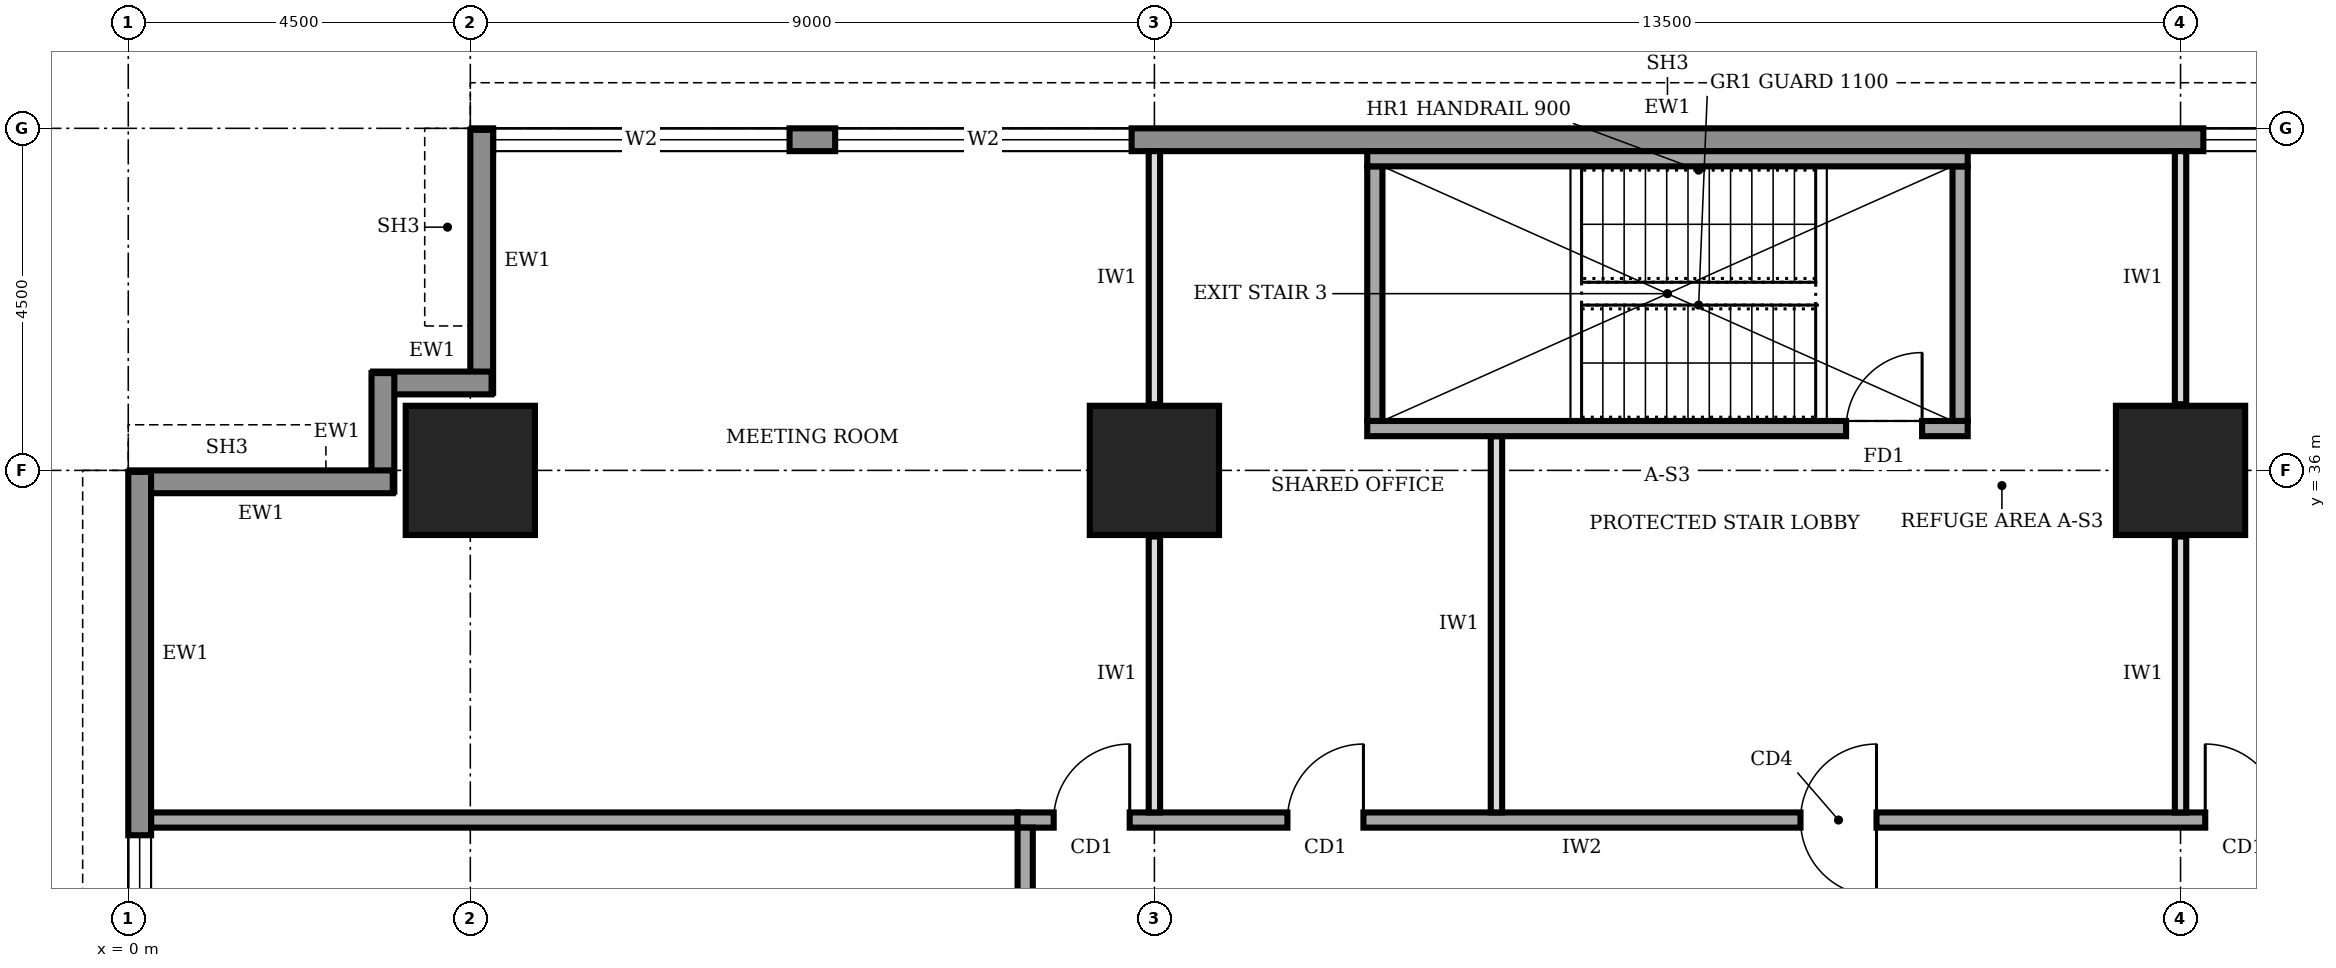
"""IFC4 building model, lengths in metres.
Left out: names, types, materials, properties, quantities, classifications, styles, units other than length and angle.
Written with IfcOpenShell. Run it as: python <this file> out.ifc"""

import sys

from ifc_helpers import new_model, si_unit, direction, frame, frame_2d, origin, origin_2d, place, context, subcontext, project, spatial, rectangle, extrude, element, fill, save


model = new_model("IFC4")
c1 = context("Model", 3, precision=1e-05, world=origin(), true_north=direction((0.0, 1.0)))
c2 = subcontext(c1, "Body", "Model", "MODEL_VIEW")
j1 = project(units=[si_unit("LENGTHUNIT", "METRE"), si_unit("PLANEANGLEUNIT", "RADIAN")], contexts=[c1])
p1 = place(None, origin())
s1 = spatial("IfcSite", under=j1, at=p1, CompositionType="ELEMENT")
p2 = place(p1, origin())
s2 = spatial("IfcBuilding", under=s1, at=p2, CompositionType="ELEMENT")
p3 = place(p2, frame((0.0, 0.0, 137.0)))
s3 = spatial("IfcBuildingStorey", under=s2, at=p3, CompositionType="ELEMENT", Elevation=137.0)
for number, where, z_axis, x_axis in (
    (1, (4.5, 36.0, 0.0), (0.0, 0.0, 1.0), (1.0, 0.0, 0.0)),
    (2, (13.5, 36.0, 0.0), (0.0, 0.0, 1.0), (1.0, 0.0, 0.0)),
    (3, (27.0, 36.0, 0.0), (0.0, 0.0, 1.0), (1.0, 0.0, 0.0)),
):
    element("IfcColumn", number, at=place(p3, frame(where, z_axis=z_axis, x_axis=x_axis)), inside=s3, PredefinedType="COLUMN", context=c2, shape_type="SweptSolid", body=[
        extrude(rectangle(XDim=1.7, YDim=1.7, at=origin_2d()), origin(), (0.0, 0.0, 1.0), 4.0),
    ])
p4 = place(p3, frame((35.98, 40.35, 0.0), z_axis=(0.0, 0.0, 1.0), x_axis=(-1.0, 0.0, 0.0)))
e4 = element("IfcWall", 4, at=p4, inside=s3, PredefinedType="STANDARD", context=c2, shape_type="SweptSolid", body=[
    extrude(rectangle(XDim=31.46, YDim=0.3, at=frame_2d((15.73, 0.0))), origin(), (0.0, 0.0, 1.0), 3.75),
])
p5 = place(p4, frame((27.28, 0.0, 0.6)))
e5 = element("IfcOpeningElement", 5, at=p5, cuts=e4, PredefinedType="OPENING", context=c2, shape_type="SweptSolid", body=[
    extrude(rectangle(XDim=3.9, YDim=2.6, at=frame_2d((1.95, 1.3))), frame((0.0, 0.16, 0.0), z_axis=(0.0, -1.0, 0.0), x_axis=(1.0, 0.0, 0.0)), (0.0, 0.0, 1.0), 0.32),
])
p6 = place(p4, frame((22.78, 0.0, 0.6)))
e6 = element("IfcOpeningElement", 6, at=p6, cuts=e4, PredefinedType="OPENING", context=c2, shape_type="SweptSolid", body=[
    extrude(rectangle(XDim=3.9, YDim=2.6, at=frame_2d((1.95, 1.3))), frame((0.0, 0.16, 0.0), z_axis=(0.0, -1.0, 0.0), x_axis=(1.0, 0.0, 0.0)), (0.0, 0.0, 1.0), 0.32),
])
p7 = place(p4, frame((4.78, 0.0, 0.6)))
e7 = element("IfcOpeningElement", 7, at=p7, cuts=e4, PredefinedType="OPENING", context=c2, shape_type="SweptSolid", body=[
    extrude(rectangle(XDim=3.9, YDim=2.6, at=frame_2d((1.95, 1.3))), frame((0.0, 0.16, 0.0), z_axis=(0.0, -1.0, 0.0), x_axis=(1.0, 0.0, 0.0)), (0.0, 0.0, 1.0), 0.32),
])
p8 = place(p3, frame((4.65, 40.48, 0.0), z_axis=(0.0, 0.0, 1.0), x_axis=(0.0, -1.0, 0.0)))
e8 = element("IfcWall", 8, at=p8, inside=s3, PredefinedType="STANDARD", context=c2, shape_type="SweptSolid", body=[
    extrude(rectangle(XDim=3.46, YDim=0.3, at=frame_2d((1.73, 0.0))), origin(), (0.0, 0.0, 1.0), 2.85),
])
for number, where, z_axis, x_axis in (
    (9, (4.78, 37.15, 0.0), (0.0, 0.0, 1.0), (-1.0, 0.0, 0.0)),
    (10, (3.35, 37.28, 0.0), (0.0, 0.0, 1.0), (0.0, -1.0, 0.0)),
):
    element("IfcWall", number, at=place(p3, frame(where, z_axis=z_axis, x_axis=x_axis)), inside=s3, PredefinedType="STANDARD", context=c2, shape_type="SweptSolid", body=[
        extrude(rectangle(XDim=1.56, YDim=0.3, at=frame_2d((0.78, 0.0))), origin(), (0.0, 0.0, 1.0), 3.75),
    ])
p9 = place(p3, frame((3.48, 35.85, 0.0), z_axis=(0.0, 0.0, 1.0), x_axis=(-1.0, 0.0, 0.0)))
e11 = element("IfcWall", 11, at=p9, inside=s3, PredefinedType="STANDARD", context=c2, shape_type="SweptSolid", body=[
    extrude(rectangle(XDim=3.46, YDim=0.3, at=frame_2d((1.73, 0.0))), origin(), (0.0, 0.0, 1.0), 2.85),
])
p10 = place(p3, frame((0.15, 35.98, 0.0), z_axis=(0.0, 0.0, 1.0), x_axis=(0.0, -1.0, 0.0)))
e12 = element("IfcWall", 12, at=p10, inside=s3, PredefinedType="STANDARD", context=c2, shape_type="SweptSolid", body=[
    extrude(rectangle(XDim=31.46, YDim=0.3, at=frame_2d((15.73, 0.0))), origin(), (0.0, 0.0, 1.0), 3.75),
])
p11 = place(p10, frame((27.28, 0.0, 0.6)))
e13 = element("IfcOpeningElement", 13, at=p11, cuts=e12, PredefinedType="OPENING", context=c2, shape_type="SweptSolid", body=[
    extrude(rectangle(XDim=3.9, YDim=2.6, at=frame_2d((1.95, 1.3))), frame((0.0, 0.16, 0.0), z_axis=(0.0, -1.0, 0.0), x_axis=(1.0, 0.0, 0.0)), (0.0, 0.0, 1.0), 0.32),
])
p12 = place(p10, frame((22.78, 0.0, 0.6)))
e14 = element("IfcOpeningElement", 14, at=p12, cuts=e12, PredefinedType="OPENING", context=c2, shape_type="SweptSolid", body=[
    extrude(rectangle(XDim=3.9, YDim=2.6, at=frame_2d((1.95, 1.3))), frame((0.0, 0.16, 0.0), z_axis=(0.0, -1.0, 0.0), x_axis=(1.0, 0.0, 0.0)), (0.0, 0.0, 1.0), 0.32),
])
p13 = place(p10, frame((18.28, 0.0, 0.6)))
e15 = element("IfcOpeningElement", 15, at=p13, cuts=e12, PredefinedType="OPENING", context=c2, shape_type="SweptSolid", body=[
    extrude(rectangle(XDim=3.9, YDim=2.6, at=frame_2d((1.95, 1.3))), frame((0.0, 0.16, 0.0), z_axis=(0.0, -1.0, 0.0), x_axis=(1.0, 0.0, 0.0)), (0.0, 0.0, 1.0), 0.32),
])
p14 = place(p10, frame((13.78, 0.0, 0.6)))
e16 = element("IfcOpeningElement", 16, at=p14, cuts=e12, PredefinedType="OPENING", context=c2, shape_type="SweptSolid", body=[
    extrude(rectangle(XDim=3.9, YDim=2.6, at=frame_2d((1.95, 1.3))), frame((0.0, 0.16, 0.0), z_axis=(0.0, -1.0, 0.0), x_axis=(1.0, 0.0, 0.0)), (0.0, 0.0, 1.0), 0.32),
])
p15 = place(p10, frame((9.28, 0.0, 0.6)))
e17 = element("IfcOpeningElement", 17, at=p15, cuts=e12, PredefinedType="OPENING", context=c2, shape_type="SweptSolid", body=[
    extrude(rectangle(XDim=3.9, YDim=2.6, at=frame_2d((1.95, 1.3))), frame((0.0, 0.16, 0.0), z_axis=(0.0, -1.0, 0.0), x_axis=(1.0, 0.0, 0.0)), (0.0, 0.0, 1.0), 0.32),
])
p16 = place(p10, frame((4.78, 0.0, 0.6)))
e18 = element("IfcOpeningElement", 18, at=p16, cuts=e12, PredefinedType="OPENING", context=c2, shape_type="SweptSolid", body=[
    extrude(rectangle(XDim=3.9, YDim=2.6, at=frame_2d((1.95, 1.3))), frame((0.0, 0.16, 0.0), z_axis=(0.0, -1.0, 0.0), x_axis=(1.0, 0.0, 0.0)), (0.0, 0.0, 1.0), 0.32),
])
p17 = place(p3, frame((28.6, 31.4, 0.0), z_axis=(0.0, 0.0, 1.0), x_axis=(-1.0, 0.0, 0.0)))
e19 = element("IfcWall", 19, at=p17, inside=s3, PredefinedType="SOLIDWALL", context=c2, shape_type="SweptSolid", body=[
    extrude(rectangle(XDim=16.9, YDim=0.2, at=frame_2d((8.45, 0.0))), origin(), (0.0, 0.0, 1.0), 3.75),
])
p18 = place(p17, frame((15.425, 0.0, 0.0)))
e20 = element("IfcOpeningElement", 20, at=p18, cuts=e19, PredefinedType="OPENING", context=c2, shape_type="SweptSolid", body=[
    extrude(rectangle(XDim=1.0, YDim=2.1, at=frame_2d((0.5, 1.05))), frame((0.0, 0.11, 0.0), z_axis=(0.0, -1.0, 0.0), x_axis=(1.0, 0.0, 0.0)), (0.0, 0.0, 1.0), 0.22),
])
p19 = place(p17, frame((12.35, 0.0, 0.0)))
e21 = element("IfcOpeningElement", 21, at=p19, cuts=e19, PredefinedType="OPENING", context=c2, shape_type="SweptSolid", body=[
    extrude(rectangle(XDim=1.0, YDim=2.1, at=frame_2d((0.5, 1.05))), frame((0.0, 0.11, 0.0), z_axis=(0.0, -1.0, 0.0), x_axis=(1.0, 0.0, 0.0)), (0.0, 0.0, 1.0), 0.22),
])
p20 = place(p17, frame((5.6, 0.0, 0.0)))
e22 = element("IfcOpeningElement", 22, at=p20, cuts=e19, PredefinedType="OPENING", context=c2, shape_type="SweptSolid", body=[
    extrude(rectangle(XDim=1.0, YDim=2.1, at=frame_2d((0.5, 1.05))), frame((0.0, 0.11, 0.0), z_axis=(0.0, -1.0, 0.0), x_axis=(1.0, 0.0, 0.0)), (0.0, 0.0, 1.0), 0.22),
])
p21 = place(p17, frame((0.275, 0.0, 0.0)))
e23 = element("IfcOpeningElement", 23, at=p21, cuts=e19, PredefinedType="OPENING", context=c2, shape_type="SweptSolid", body=[
    extrude(rectangle(XDim=1.0, YDim=2.1, at=frame_2d((0.5, 1.05))), frame((0.0, 0.11, 0.0), z_axis=(0.0, -1.0, 0.0), x_axis=(1.0, 0.0, 0.0)), (0.0, 0.0, 1.0), 0.22),
])
p22 = place(p3, frame((11.8, 31.3, 0.0), z_axis=(0.0, 0.0, 1.0), x_axis=(0.0, -1.0, 0.0)))
e24 = element("IfcWall", 24, at=p22, inside=s3, PredefinedType="SOLIDWALL", context=c2, shape_type="SweptSolid", body=[
    extrude(rectangle(XDim=22.3, YDim=0.2, at=frame_2d((11.15, 0.0))), origin(), (0.0, 0.0, 1.0), 3.75),
])
p23 = place(p22, frame((19.55, 0.0, 0.0)))
e25 = element("IfcOpeningElement", 25, at=p23, cuts=e24, PredefinedType="OPENING", context=c2, shape_type="SweptSolid", body=[
    extrude(rectangle(XDim=1.0, YDim=2.1, at=frame_2d((0.5, 1.05))), frame((0.0, 0.11, 0.0), z_axis=(0.0, -1.0, 0.0), x_axis=(1.0, 0.0, 0.0)), (0.0, 0.0, 1.0), 0.22),
])
p24 = place(p22, frame((15.45, 0.0, 0.0)))
e26 = element("IfcOpeningElement", 26, at=p24, cuts=e24, PredefinedType="OPENING", context=c2, shape_type="SweptSolid", body=[
    extrude(rectangle(XDim=0.9, YDim=2.1, at=frame_2d((0.45, 1.05))), frame((0.0, 0.11, 0.0), z_axis=(0.0, -1.0, 0.0), x_axis=(1.0, 0.0, 0.0)), (0.0, 0.0, 1.0), 0.22),
])
p25 = place(p22, frame((12.45, 0.0, 0.0)))
e27 = element("IfcOpeningElement", 27, at=p25, cuts=e24, PredefinedType="OPENING", context=c2, shape_type="SweptSolid", body=[
    extrude(rectangle(XDim=0.9, YDim=2.1, at=frame_2d((0.45, 1.05))), frame((0.0, 0.11, 0.0), z_axis=(0.0, -1.0, 0.0), x_axis=(1.0, 0.0, 0.0)), (0.0, 0.0, 1.0), 0.22),
])
p26 = place(p22, frame((7.6, 0.0, 0.0)))
e28 = element("IfcOpeningElement", 28, at=p26, cuts=e24, PredefinedType="OPENING", context=c2, shape_type="SweptSolid", body=[
    extrude(rectangle(XDim=0.9, YDim=2.1, at=frame_2d((0.45, 1.05))), frame((0.0, 0.11, 0.0), z_axis=(0.0, -1.0, 0.0), x_axis=(1.0, 0.0, 0.0)), (0.0, 0.0, 1.0), 0.22),
])
p27 = place(p22, frame((4.8, 0.0, 0.0)))
e29 = element("IfcOpeningElement", 29, at=p27, cuts=e24, PredefinedType="OPENING", context=c2, shape_type="SweptSolid", body=[
    extrude(rectangle(XDim=1.0, YDim=2.1, at=frame_2d((0.5, 1.05))), frame((0.0, 0.11, 0.0), z_axis=(0.0, -1.0, 0.0), x_axis=(1.0, 0.0, 0.0)), (0.0, 0.0, 1.0), 0.22),
])
p28 = place(p22, frame((10.3, 0.0, 0.0)))
e30 = element("IfcOpeningElement", 30, at=p28, cuts=e24, PredefinedType="OPENING", context=c2, shape_type="SweptSolid", body=[
    extrude(rectangle(XDim=1.0, YDim=2.1, at=frame_2d((0.5, 1.05))), frame((0.0, 0.11, 0.0), z_axis=(0.0, -1.0, 0.0), x_axis=(1.0, 0.0, 0.0)), (0.0, 0.0, 1.0), 0.22),
])
p29 = place(p22, frame((1.55, 0.0, 0.0)))
e31 = element("IfcOpeningElement", 31, at=p29, cuts=e24, PredefinedType="OPENING", context=c2, shape_type="SweptSolid", body=[
    extrude(rectangle(XDim=1.0, YDim=2.1, at=frame_2d((0.5, 1.05))), frame((0.0, 0.11, 0.0), z_axis=(0.0, -1.0, 0.0), x_axis=(1.0, 0.0, 0.0)), (0.0, 0.0, 1.0), 0.22),
])
p30 = place(p3, frame((0.3, 31.4, 0.0), z_axis=(0.0, 0.0, 1.0), x_axis=(1.0, 0.0, 0.0)))
e32 = element("IfcWall", 32, at=p30, inside=s3, PredefinedType="SOLIDWALL", context=c2, shape_type="SweptSolid", body=[
    extrude(rectangle(XDim=11.4, YDim=0.2, at=frame_2d((5.7, 0.0))), origin(), (0.0, 0.0, 1.0), 3.75),
])
p31 = place(p3, frame((13.5, 31.5, 0.0), z_axis=(0.0, 0.0, 1.0), x_axis=(0.0, 1.0, 0.0)))
e33 = element("IfcWall", 33, at=p31, inside=s3, PredefinedType="PARTITIONING", context=c2, shape_type="SweptSolid", body=[
    extrude(rectangle(XDim=3.63, YDim=0.15, at=frame_2d((1.815, 0.0))), origin(), (0.0, 0.0, 1.0), 2.85),
])
p32 = place(p3, frame((13.5, 36.87, 0.0), z_axis=(0.0, 0.0, 1.0), x_axis=(0.0, 1.0, 0.0)))
e34 = element("IfcWall", 34, at=p32, inside=s3, PredefinedType="PARTITIONING", context=c2, shape_type="SweptSolid", body=[
    extrude(rectangle(XDim=3.33, YDim=0.15, at=frame_2d((1.665, 0.0))), origin(), (0.0, 0.0, 1.0), 2.85),
])
p33 = place(p3, frame((18.0, 31.5, 0.0), z_axis=(0.0, 0.0, 1.0), x_axis=(0.0, 1.0, 0.0)))
e35 = element("IfcWall", 35, at=p33, inside=s3, PredefinedType="PARTITIONING", context=c2, shape_type="SweptSolid", body=[
    extrude(rectangle(XDim=4.95, YDim=0.15, at=frame_2d((2.475, 0.0))), origin(), (0.0, 0.0, 1.0), 3.75),
])
p34 = place(p3, frame((27.0, 31.5, 0.0), z_axis=(0.0, 0.0, 1.0), x_axis=(0.0, 1.0, 0.0)))
e36 = element("IfcWall", 36, at=p34, inside=s3, PredefinedType="PARTITIONING", context=c2, shape_type="SweptSolid", body=[
    extrude(rectangle(XDim=3.63, YDim=0.15, at=frame_2d((1.815, 0.0))), origin(), (0.0, 0.0, 1.0), 2.85),
])
p35 = place(p3, frame((27.0, 36.87, 0.0), z_axis=(0.0, 0.0, 1.0), x_axis=(0.0, 1.0, 0.0)))
e37 = element("IfcWall", 37, at=p35, inside=s3, PredefinedType="PARTITIONING", context=c2, shape_type="SweptSolid", body=[
    extrude(rectangle(XDim=3.33, YDim=0.15, at=frame_2d((1.665, 0.0))), origin(), (0.0, 0.0, 1.0), 2.85),
])
p36 = place(p3, frame((16.3, 36.55, 0.0), z_axis=(0.0, 0.0, 1.0), x_axis=(1.0, 0.0, 0.0)))
e38 = element("IfcWall", 38, at=p36, inside=s3, PredefinedType="SOLIDWALL", context=c2, shape_type="SweptSolid", body=[
    extrude(rectangle(XDim=7.9, YDim=0.2, at=frame_2d((3.95, 0.0))), origin(), (0.0, 0.0, 1.0), 3.75),
])
p37 = place(p36, frame((6.3, 0.0, 0.0)))
e39 = element("IfcOpeningElement", 39, at=p37, cuts=e38, PredefinedType="OPENING", context=c2, shape_type="SweptSolid", body=[
    extrude(rectangle(XDim=1.0, YDim=2.1, at=frame_2d((0.5, 1.05))), frame((0.0, 0.11, 0.0), z_axis=(0.0, -1.0, 0.0), x_axis=(1.0, 0.0, 0.0)), (0.0, 0.0, 1.0), 0.22),
])
p38 = place(p3, frame((16.3, 40.1, 0.0), z_axis=(0.0, 0.0, 1.0), x_axis=(1.0, 0.0, 0.0)))
e40 = element("IfcWall", 40, at=p38, inside=s3, PredefinedType="SOLIDWALL", context=c2, shape_type="SweptSolid", body=[
    extrude(rectangle(XDim=7.9, YDim=0.2, at=frame_2d((3.95, 0.0))), origin(), (0.0, 0.0, 1.0), 3.75),
])
for number, where, z_axis, x_axis in (
    (41, (16.4, 36.65, 0.0), (0.0, 0.0, 1.0), (0.0, 1.0, 0.0)),
    (42, (24.1, 36.65, 0.0), (0.0, 0.0, 1.0), (0.0, 1.0, 0.0)),
):
    element("IfcWall", number, at=place(p3, frame(where, z_axis=z_axis, x_axis=x_axis)), inside=s3, PredefinedType="SOLIDWALL", context=c2, shape_type="SweptSolid", body=[
        extrude(rectangle(XDim=3.35, YDim=0.2, at=frame_2d((1.675, 0.0))), origin(), (0.0, 0.0, 1.0), 3.75),
    ])
p39 = place(p5, origin())
e43 = element("IfcWindow", 43, at=p39, inside=s3, PartitioningType="SINGLE_PANEL", PredefinedType="WINDOW", context=c2, shape_type="SweptSolid", body=[
    extrude(rectangle(XDim=3.9, YDim=2.6, at=frame_2d((1.95, 1.3))), frame((0.0, 0.03, 0.0), z_axis=(0.0, -1.0, 0.0), x_axis=(1.0, 0.0, 0.0)), (0.0, 0.0, 1.0), 0.06),
])
fill(e5, e43)
p40 = place(p6, origin())
e44 = element("IfcWindow", 44, at=p40, inside=s3, PartitioningType="SINGLE_PANEL", PredefinedType="WINDOW", context=c2, shape_type="SweptSolid", body=[
    extrude(rectangle(XDim=3.9, YDim=2.6, at=frame_2d((1.95, 1.3))), frame((0.0, 0.03, 0.0), z_axis=(0.0, -1.0, 0.0), x_axis=(1.0, 0.0, 0.0)), (0.0, 0.0, 1.0), 0.06),
])
fill(e6, e44)
p41 = place(p7, origin())
e45 = element("IfcWindow", 45, at=p41, inside=s3, PartitioningType="SINGLE_PANEL", PredefinedType="WINDOW", context=c2, shape_type="SweptSolid", body=[
    extrude(rectangle(XDim=3.9, YDim=2.6, at=frame_2d((1.95, 1.3))), frame((0.0, 0.03, 0.0), z_axis=(0.0, -1.0, 0.0), x_axis=(1.0, 0.0, 0.0)), (0.0, 0.0, 1.0), 0.06),
])
fill(e7, e45)
p42 = place(p16, origin())
e46 = element("IfcWindow", 46, at=p42, inside=s3, PartitioningType="SINGLE_PANEL", PredefinedType="WINDOW", context=c2, shape_type="SweptSolid", body=[
    extrude(rectangle(XDim=3.9, YDim=2.6, at=frame_2d((1.95, 1.3))), frame((0.0, 0.03, 0.0), z_axis=(0.0, -1.0, 0.0), x_axis=(1.0, 0.0, 0.0)), (0.0, 0.0, 1.0), 0.06),
])
fill(e18, e46)
p43 = place(p18, frame((1.0, 0.0, 0.0), z_axis=(0.0, 0.0, 1.0), x_axis=(-1.0, 0.0, 0.0)))
e47 = element("IfcDoor", 47, at=p43, inside=s3, OperationType="SINGLE_SWING_RIGHT", PredefinedType="DOOR", context=c2, shape_type="SweptSolid", body=[
    extrude(rectangle(XDim=1.0, YDim=2.1, at=frame_2d((0.5, 1.05))), frame((0.0, 0.025, 0.0), z_axis=(0.0, -1.0, 0.0), x_axis=(1.0, 0.0, 0.0)), (0.0, 0.0, 1.0), 0.05),
])
fill(e20, e47)
p44 = place(p19, frame((1.0, 0.0, 0.0), z_axis=(0.0, 0.0, 1.0), x_axis=(-1.0, 0.0, 0.0)))
e48 = element("IfcDoor", 48, at=p44, inside=s3, OperationType="SINGLE_SWING_RIGHT", PredefinedType="DOOR", context=c2, shape_type="SweptSolid", body=[
    extrude(rectangle(XDim=1.0, YDim=2.1, at=frame_2d((0.5, 1.05))), frame((0.0, 0.025, 0.0), z_axis=(0.0, -1.0, 0.0), x_axis=(1.0, 0.0, 0.0)), (0.0, 0.0, 1.0), 0.05),
])
fill(e21, e48)
p45 = place(p20, origin())
e49 = element("IfcDoor", 49, at=p45, inside=s3, OperationType="DOUBLE_SWING_LEFT", PredefinedType="DOOR", context=c2, shape_type="SweptSolid", body=[
    extrude(rectangle(XDim=1.0, YDim=2.1, at=frame_2d((0.5, 1.05))), frame((0.0, 0.025, 0.0), z_axis=(0.0, -1.0, 0.0), x_axis=(1.0, 0.0, 0.0)), (0.0, 0.0, 1.0), 0.05),
])
fill(e22, e49)
p46 = place(p21, frame((1.0, 0.0, 0.0), z_axis=(0.0, 0.0, 1.0), x_axis=(-1.0, 0.0, 0.0)))
e50 = element("IfcDoor", 50, at=p46, inside=s3, OperationType="SINGLE_SWING_LEFT", PredefinedType="DOOR", context=c2, shape_type="SweptSolid", body=[
    extrude(rectangle(XDim=1.0, YDim=2.1, at=frame_2d((0.5, 1.05))), frame((0.0, 0.025, 0.0), z_axis=(0.0, -1.0, 0.0), x_axis=(1.0, 0.0, 0.0)), (0.0, 0.0, 1.0), 0.05),
])
fill(e23, e50)
p47 = place(p37, origin())
e51 = element("IfcDoor", 51, at=p47, inside=s3, OperationType="SINGLE_SWING_RIGHT", PredefinedType="DOOR", context=c2, shape_type="SweptSolid", body=[
    extrude(rectangle(XDim=1.0, YDim=2.1, at=frame_2d((0.5, 1.05))), frame((0.0, 0.025, 0.0), z_axis=(0.0, -1.0, 0.0), x_axis=(1.0, 0.0, 0.0)), (0.0, 0.0, 1.0), 0.05),
])
fill(e39, e51)
save(model, sys.argv[1])
